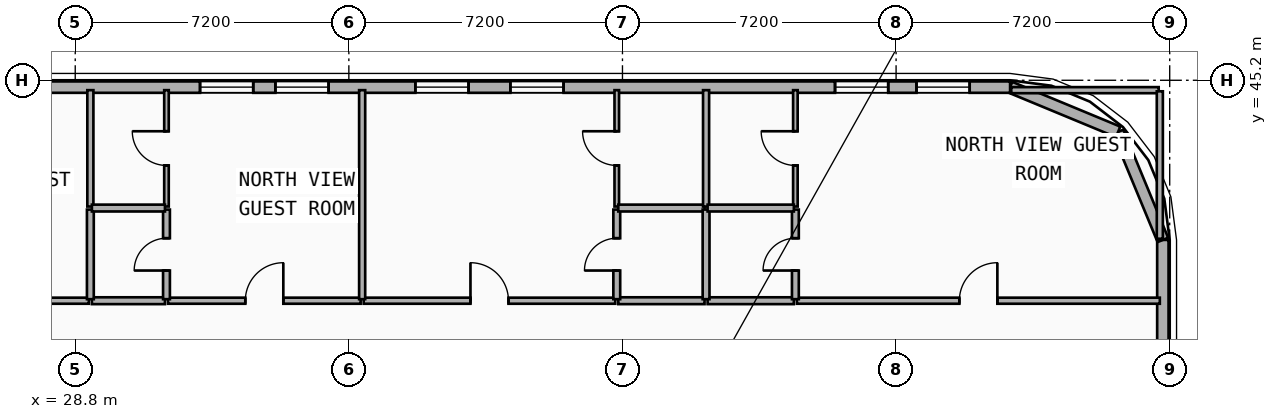
"""IFC4 building model, lengths in metres.
Left out: names, types, materials, properties, quantities, classifications, styles, units other than length and angle.
Written with IfcOpenShell. Run it as: python <this file> out.ifc"""

import sys

from ifc_helpers import new_model, si_unit, direction, frame, frame_2d, origin, place, context, subcontext, project, spatial, rectangle, extrude, element, fill, save


model = new_model("IFC4")
c1 = context("Model", 3, precision=1e-05, world=origin(), true_north=direction((0.0, 1.0)))
c2 = subcontext(c1, "Body", "Model", "MODEL_VIEW")
j1 = project(units=[si_unit("LENGTHUNIT", "METRE"), si_unit("PLANEANGLEUNIT", "RADIAN")], contexts=[c1])
p1 = place(None, origin())
s1 = spatial("IfcSite", under=j1, at=p1, CompositionType="ELEMENT")
p2 = place(p1, origin())
s2 = spatial("IfcBuilding", under=s1, at=p2, CompositionType="ELEMENT")
p3 = place(p2, frame((0.0, 0.0, 32.5)))
s3 = spatial("IfcBuildingStorey", under=s2, at=p3, CompositionType="ELEMENT", Elevation=32.5)
p4 = place(p3, frame((57.42, 41.0, 0.0), z_axis=(0.0, 0.0, 1.0), x_axis=(0.0, -1.0, 0.0)))
e1 = element("IfcWall", 1, at=p4, inside=s3, PredefinedType="SOLIDWALL", context=c2, shape_type="SweptSolid", body=[
    extrude(rectangle(XDim=15.2, YDim=0.3, at=frame_2d((7.6, 0.0))), origin(), (0.0, 0.0, 1.0), 3.24),
])
p5 = place(p4, frame((10.882, 0.0, 0.48)))
e2 = element("IfcOpeningElement", 2, at=p5, cuts=e1, PredefinedType="OPENING", context=c2, shape_type="SweptSolid", body=[
    extrude(rectangle(XDim=1.4, YDim=1.8, at=frame_2d((0.7, 0.9))), frame((0.0, 0.16, 0.0), z_axis=(0.0, -1.0, 0.0), x_axis=(1.0, 0.0, 0.0)), (0.0, 0.0, 1.0), 0.32),
])
p6 = place(p4, frame((5.621, 0.0, 0.48)))
e3 = element("IfcOpeningElement", 3, at=p6, cuts=e1, PredefinedType="OPENING", context=c2, shape_type="SweptSolid", body=[
    extrude(rectangle(XDim=1.4, YDim=1.8, at=frame_2d((0.7, 0.9))), frame((0.0, 0.16, 0.0), z_axis=(0.0, -1.0, 0.0), x_axis=(1.0, 0.0, 0.0)), (0.0, 0.0, 1.0), 0.32),
])
p7 = place(p3, frame((56.243, 43.843, 0.0), z_axis=(0.0, 0.0, 1.0), x_axis=(0.382636798336, -0.92389884758, 0.0)))
e4 = element("IfcWall", 4, at=p7, inside=s3, PredefinedType="SOLIDWALL", context=c2, shape_type="SweptSolid", body=[
    extrude(rectangle(XDim=3.077, YDim=0.3, at=frame_2d((1.538, 0.0))), origin(), (0.0, 0.0, 1.0), 3.24),
])
p8 = place(p3, frame((53.4, 45.02, 0.0), z_axis=(0.0, 0.0, 1.0), x_axis=(0.923882414032, -0.382676475685, 0.0)))
e5 = element("IfcWall", 5, at=p8, inside=s3, PredefinedType="SOLIDWALL", context=c2, shape_type="SweptSolid", body=[
    extrude(rectangle(XDim=3.077, YDim=0.3, at=frame_2d((1.539, 0.0))), origin(), (0.0, 0.0, 1.0), 3.24),
])
p9 = place(p3, frame((4.2, 45.02, 0.0), z_axis=(0.0, 0.0, 1.0), x_axis=(1.0, 0.0, 0.0)))
e6 = element("IfcWall", 6, at=p9, inside=s3, PredefinedType="SOLIDWALL", context=c2, shape_type="SweptSolid", body=[
    extrude(rectangle(XDim=49.2, YDim=0.3, at=frame_2d((24.6, 0.0))), origin(), (0.0, 0.0, 1.0), 3.24),
])
p10 = place(p9, frame((5.87, 0.0, 0.85)))
e7 = element("IfcOpeningElement", 7, at=p10, cuts=e6, PredefinedType="OPENING", context=c2, shape_type="SweptSolid", body=[
    extrude(rectangle(XDim=1.4, YDim=1.8, at=frame_2d((0.7, 0.9))), frame((0.0, 0.16, 0.0), z_axis=(0.0, -1.0, 0.0), x_axis=(1.0, 0.0, 0.0)), (0.0, 0.0, 1.0), 0.32),
])
p11 = place(p9, frame((8.481, 0.0, 0.85)))
e8 = element("IfcOpeningElement", 8, at=p11, cuts=e6, PredefinedType="OPENING", context=c2, shape_type="SweptSolid", body=[
    extrude(rectangle(XDim=1.4, YDim=1.8, at=frame_2d((0.7, 0.9))), frame((0.0, 0.16, 0.0), z_axis=(0.0, -1.0, 0.0), x_axis=(1.0, 0.0, 0.0)), (0.0, 0.0, 1.0), 0.32),
])
p12 = place(p9, frame((18.227, 0.0, 0.85)))
e9 = element("IfcOpeningElement", 9, at=p12, cuts=e6, PredefinedType="OPENING", context=c2, shape_type="SweptSolid", body=[
    extrude(rectangle(XDim=1.4, YDim=1.8, at=frame_2d((0.7, 0.9))), frame((0.0, 0.16, 0.0), z_axis=(0.0, -1.0, 0.0), x_axis=(1.0, 0.0, 0.0)), (0.0, 0.0, 1.0), 0.32),
])
p13 = place(p9, frame((21.462, 0.0, 0.85)))
e10 = element("IfcOpeningElement", 10, at=p13, cuts=e6, PredefinedType="OPENING", context=c2, shape_type="SweptSolid", body=[
    extrude(rectangle(XDim=1.4, YDim=1.8, at=frame_2d((0.7, 0.9))), frame((0.0, 0.16, 0.0), z_axis=(0.0, -1.0, 0.0), x_axis=(1.0, 0.0, 0.0)), (0.0, 0.0, 1.0), 0.32),
])
p14 = place(p9, frame((27.884, 0.0, 0.85)))
e11 = element("IfcOpeningElement", 11, at=p14, cuts=e6, PredefinedType="OPENING", context=c2, shape_type="SweptSolid", body=[
    extrude(rectangle(XDim=1.4, YDim=1.8, at=frame_2d((0.7, 0.9))), frame((0.0, 0.16, 0.0), z_axis=(0.0, -1.0, 0.0), x_axis=(1.0, 0.0, 0.0)), (0.0, 0.0, 1.0), 0.32),
])
p15 = place(p9, frame((29.867, 0.0, 0.85)))
e12 = element("IfcOpeningElement", 12, at=p15, cuts=e6, PredefinedType="OPENING", context=c2, shape_type="SweptSolid", body=[
    extrude(rectangle(XDim=1.4, YDim=1.8, at=frame_2d((0.7, 0.9))), frame((0.0, 0.16, 0.0), z_axis=(0.0, -1.0, 0.0), x_axis=(1.0, 0.0, 0.0)), (0.0, 0.0, 1.0), 0.32),
])
p16 = place(p9, frame((33.55, 0.0, 0.85)))
e13 = element("IfcOpeningElement", 13, at=p16, cuts=e6, PredefinedType="OPENING", context=c2, shape_type="SweptSolid", body=[
    extrude(rectangle(XDim=1.4, YDim=1.8, at=frame_2d((0.7, 0.9))), frame((0.0, 0.16, 0.0), z_axis=(0.0, -1.0, 0.0), x_axis=(1.0, 0.0, 0.0)), (0.0, 0.0, 1.0), 0.32),
])
p17 = place(p9, frame((36.05, 0.0, 0.85)))
e14 = element("IfcOpeningElement", 14, at=p17, cuts=e6, PredefinedType="OPENING", context=c2, shape_type="SweptSolid", body=[
    extrude(rectangle(XDim=1.4, YDim=1.8, at=frame_2d((0.7, 0.9))), frame((0.0, 0.16, 0.0), z_axis=(0.0, -1.0, 0.0), x_axis=(1.0, 0.0, 0.0)), (0.0, 0.0, 1.0), 0.32),
])
p18 = place(p9, frame((44.593, 0.0, 0.85)))
e15 = element("IfcOpeningElement", 15, at=p18, cuts=e6, PredefinedType="OPENING", context=c2, shape_type="SweptSolid", body=[
    extrude(rectangle(XDim=1.4, YDim=1.8, at=frame_2d((0.7, 0.9))), frame((0.0, 0.16, 0.0), z_axis=(0.0, -1.0, 0.0), x_axis=(1.0, 0.0, 0.0)), (0.0, 0.0, 1.0), 0.32),
])
p19 = place(p9, frame((46.737, 0.0, 0.85)))
e16 = element("IfcOpeningElement", 16, at=p19, cuts=e6, PredefinedType="OPENING", context=c2, shape_type="SweptSolid", body=[
    extrude(rectangle(XDim=1.4, YDim=1.8, at=frame_2d((0.7, 0.9))), frame((0.0, 0.16, 0.0), z_axis=(0.0, -1.0, 0.0), x_axis=(1.0, 0.0, 0.0)), (0.0, 0.0, 1.0), 0.32),
])
p20 = place(p3, frame((20.331, 39.4, 0.0), z_axis=(0.0, 0.0, 1.0), x_axis=(1.0, 0.0, 0.0)))
e17 = element("IfcWall", 17, at=p20, inside=s3, PredefinedType="PARTITIONING", context=c2, shape_type="SweptSolid", body=[
    extrude(rectangle(XDim=8.827, YDim=0.16, at=frame_2d((4.414, 0.0))), origin(), (0.0, 0.0, 1.0), 3.24),
])
p21 = place(p20, frame((3.914, 0.0, 0.0)))
e18 = element("IfcOpeningElement", 18, at=p21, cuts=e17, PredefinedType="OPENING", context=c2, shape_type="SweptSolid", body=[
    extrude(rectangle(XDim=1.0, YDim=2.15, at=frame_2d((0.5, 1.075))), frame((0.0, 0.09, 0.0), z_axis=(0.0, -1.0, 0.0), x_axis=(1.0, 0.0, 0.0)), (0.0, 0.0, 1.0), 0.18),
])
p22 = place(p3, frame((31.241, 39.4, 0.0), z_axis=(0.0, 0.0, 1.0), x_axis=(1.0, 0.0, 0.0)))
e19 = element("IfcWall", 19, at=p22, inside=s3, PredefinedType="PARTITIONING", context=c2, shape_type="SweptSolid", body=[
    extrude(rectangle(XDim=5.069, YDim=0.16, at=frame_2d((2.535, 0.0))), origin(), (0.0, 0.0, 1.0), 3.24),
])
p23 = place(p22, frame((2.034, 0.0, 0.0)))
e20 = element("IfcOpeningElement", 20, at=p23, cuts=e19, PredefinedType="OPENING", context=c2, shape_type="SweptSolid", body=[
    extrude(rectangle(XDim=1.0, YDim=2.15, at=frame_2d((0.5, 1.075))), frame((0.0, 0.09, 0.0), z_axis=(0.0, -1.0, 0.0), x_axis=(1.0, 0.0, 0.0)), (0.0, 0.0, 1.0), 0.18),
])
p24 = place(p3, frame((29.238, 39.4, 0.0), z_axis=(0.0, 0.0, 1.0), x_axis=(1.0, 0.0, 0.0)))
e21 = element("IfcWall", 21, at=p24, inside=s3, PredefinedType="PLUMBINGWALL", context=c2, shape_type="SweptSolid", body=[
    extrude(rectangle(XDim=1.923, YDim=0.18, at=frame_2d((0.961, 0.0))), origin(), (0.0, 0.0, 1.0), 3.24),
])
p25 = place(p3, frame((36.39, 39.4, 0.0), z_axis=(0.0, 0.0, 1.0), x_axis=(1.0, 0.0, 0.0)))
e22 = element("IfcWall", 22, at=p25, inside=s3, PredefinedType="PARTITIONING", context=c2, shape_type="SweptSolid", body=[
    extrude(rectangle(XDim=6.62, YDim=0.16, at=frame_2d((3.31, 0.0))), origin(), (0.0, 0.0, 1.0), 3.24),
])
p26 = place(p25, frame((2.81, 0.0, 0.0)))
e23 = element("IfcOpeningElement", 23, at=p26, cuts=e22, PredefinedType="OPENING", context=c2, shape_type="SweptSolid", body=[
    extrude(rectangle(XDim=1.0, YDim=2.15, at=frame_2d((0.5, 1.075))), frame((0.0, 0.09, 0.0), z_axis=(0.0, -1.0, 0.0), x_axis=(1.0, 0.0, 0.0)), (0.0, 0.0, 1.0), 0.18),
])
p27 = place(p3, frame((43.09, 39.4, 0.0), z_axis=(0.0, 0.0, 1.0), x_axis=(1.0, 0.0, 0.0)))
e24 = element("IfcWall", 24, at=p27, inside=s3, PredefinedType="PLUMBINGWALL", context=c2, shape_type="SweptSolid", body=[
    extrude(rectangle(XDim=2.27, YDim=0.18, at=frame_2d((1.135, 0.0))), origin(), (0.0, 0.0, 1.0), 3.24),
])
p28 = place(p3, frame((47.79, 39.4, 0.0), z_axis=(0.0, 0.0, 1.0), x_axis=(1.0, 0.0, 0.0)))
e25 = element("IfcWall", 25, at=p28, inside=s3, PredefinedType="PARTITIONING", context=c2, shape_type="SweptSolid", body=[
    extrude(rectangle(XDim=9.55, YDim=0.16, at=frame_2d((4.775, 0.0))), origin(), (0.0, 0.0, 1.0), 3.24),
])
p29 = place(p28, frame((4.275, 0.0, 0.0)))
e26 = element("IfcOpeningElement", 26, at=p29, cuts=e25, PredefinedType="OPENING", context=c2, shape_type="SweptSolid", body=[
    extrude(rectangle(XDim=1.0, YDim=2.15, at=frame_2d((0.5, 1.075))), frame((0.0, 0.09, 0.0), z_axis=(0.0, -1.0, 0.0), x_axis=(1.0, 0.0, 0.0)), (0.0, 0.0, 1.0), 0.18),
])
p30 = place(p3, frame((45.44, 39.4, 0.0), z_axis=(0.0, 0.0, 1.0), x_axis=(1.0, 0.0, 0.0)))
e27 = element("IfcWall", 27, at=p30, inside=s3, PredefinedType="PLUMBINGWALL", context=c2, shape_type="SweptSolid", body=[
    extrude(rectangle(XDim=2.27, YDim=0.18, at=frame_2d((1.135, 0.0))), origin(), (0.0, 0.0, 1.0), 3.24),
])
p31 = place(p3, frame((29.198, 39.44, 0.0), z_axis=(0.0, 0.0, 1.0), x_axis=(0.0, 1.0, 0.0)))
e28 = element("IfcWall", 28, at=p31, inside=s3, PredefinedType="PLUMBINGWALL", context=c2, shape_type="SweptSolid", body=[
    extrude(rectangle(XDim=2.358, YDim=0.18, at=frame_2d((1.179, 0.0))), origin(), (0.0, 0.0, 1.0), 3.24),
])
p32 = place(p3, frame((29.198, 41.878, 0.0), z_axis=(0.0, 0.0, 1.0), x_axis=(0.0, 1.0, 0.0)))
e29 = element("IfcWall", 29, at=p32, inside=s3, PredefinedType="PARTITIONING", context=c2, shape_type="SweptSolid", body=[
    extrude(rectangle(XDim=3.062, YDim=0.16, at=frame_2d((1.531, 0.0))), origin(), (0.0, 0.0, 1.0), 3.24),
])
p33 = place(p3, frame((31.201, 39.44, 0.0), z_axis=(0.0, 0.0, 1.0), x_axis=(0.0, 1.0, 0.0)))
e30 = element("IfcWall", 30, at=p33, inside=s3, PredefinedType="PLUMBINGWALL", context=c2, shape_type="SweptSolid", body=[
    extrude(rectangle(XDim=2.358, YDim=0.18, at=frame_2d((1.179, 0.0))), origin(), (0.0, 0.0, 1.0), 3.24),
])
p34 = place(p33, frame((0.754, 0.0, 0.0)))
e31 = element("IfcOpeningElement", 31, at=p34, cuts=e30, PredefinedType="OPENING", context=c2, shape_type="SweptSolid", body=[
    extrude(rectangle(XDim=0.85, YDim=2.1, at=frame_2d((0.425, 1.05))), frame((0.0, 0.1, 0.0), z_axis=(0.0, -1.0, 0.0), x_axis=(1.0, 0.0, 0.0)), (0.0, 0.0, 1.0), 0.2),
])
p35 = place(p3, frame((31.201, 41.878, 0.0), z_axis=(0.0, 0.0, 1.0), x_axis=(0.0, 1.0, 0.0)))
e32 = element("IfcWall", 32, at=p35, inside=s3, PredefinedType="PARTITIONING", context=c2, shape_type="SweptSolid", body=[
    extrude(rectangle(XDim=3.062, YDim=0.12, at=frame_2d((1.531, 0.0))), origin(), (0.0, 0.0, 1.0), 3.24),
])
p36 = place(p35, frame((1.081, 0.0, 0.0)))
e33 = element("IfcOpeningElement", 33, at=p36, cuts=e32, PredefinedType="OPENING", context=c2, shape_type="SweptSolid", body=[
    extrude(rectangle(XDim=0.9, YDim=2.1, at=frame_2d((0.45, 1.05))), frame((0.0, 0.07, 0.0), z_axis=(0.0, -1.0, 0.0), x_axis=(1.0, 0.0, 0.0)), (0.0, 0.0, 1.0), 0.14),
])
p37 = place(p3, frame((36.35, 39.44, 0.0), z_axis=(0.0, 0.0, 1.0), x_axis=(0.0, 1.0, 0.0)))
e34 = element("IfcWall", 34, at=p37, inside=s3, PredefinedType="PARTITIONING", context=c2, shape_type="SweptSolid", body=[
    extrude(rectangle(XDim=5.5, YDim=0.16, at=frame_2d((2.75, 0.0))), origin(), (0.0, 0.0, 1.0), 3.24),
])
p38 = place(p3, frame((29.238, 41.838, 0.0), z_axis=(0.0, 0.0, 1.0), x_axis=(1.0, 0.0, 0.0)))
e35 = element("IfcWall", 35, at=p38, inside=s3, PredefinedType="PLUMBINGWALL", context=c2, shape_type="SweptSolid", body=[
    extrude(rectangle(XDim=1.923, YDim=0.18, at=frame_2d((0.961, 0.0))), origin(), (0.0, 0.0, 1.0), 3.24),
])
p39 = place(p3, frame((43.05, 39.44, 0.0), z_axis=(0.0, 0.0, 1.0), x_axis=(0.0, 1.0, 0.0)))
e36 = element("IfcWall", 36, at=p39, inside=s3, PredefinedType="PLUMBINGWALL", context=c2, shape_type="SweptSolid", body=[
    extrude(rectangle(XDim=2.358, YDim=0.18, at=frame_2d((1.179, 0.0))), origin(), (0.0, 0.0, 1.0), 3.24),
])
p40 = place(p39, frame((0.754, 0.0, 0.0)))
e37 = element("IfcOpeningElement", 37, at=p40, cuts=e36, PredefinedType="OPENING", context=c2, shape_type="SweptSolid", body=[
    extrude(rectangle(XDim=0.85, YDim=2.1, at=frame_2d((0.425, 1.05))), frame((0.0, 0.1, 0.0), z_axis=(0.0, -1.0, 0.0), x_axis=(1.0, 0.0, 0.0)), (0.0, 0.0, 1.0), 0.2),
])
p41 = place(p3, frame((43.05, 41.878, 0.0), z_axis=(0.0, 0.0, 1.0), x_axis=(0.0, 1.0, 0.0)))
e38 = element("IfcWall", 38, at=p41, inside=s3, PredefinedType="PARTITIONING", context=c2, shape_type="SweptSolid", body=[
    extrude(rectangle(XDim=3.062, YDim=0.12, at=frame_2d((1.531, 0.0))), origin(), (0.0, 0.0, 1.0), 3.24),
])
p42 = place(p41, frame((1.081, 0.0, 0.0)))
e39 = element("IfcOpeningElement", 39, at=p42, cuts=e38, PredefinedType="OPENING", context=c2, shape_type="SweptSolid", body=[
    extrude(rectangle(XDim=0.9, YDim=2.1, at=frame_2d((0.45, 1.05))), frame((0.0, 0.07, 0.0), z_axis=(0.0, -1.0, 0.0), x_axis=(1.0, 0.0, 0.0)), (0.0, 0.0, 1.0), 0.14),
])
p43 = place(p3, frame((43.09, 41.838, 0.0), z_axis=(0.0, 0.0, 1.0), x_axis=(1.0, 0.0, 0.0)))
e40 = element("IfcWall", 40, at=p43, inside=s3, PredefinedType="PLUMBINGWALL", context=c2, shape_type="SweptSolid", body=[
    extrude(rectangle(XDim=2.27, YDim=0.18, at=frame_2d((1.135, 0.0))), origin(), (0.0, 0.0, 1.0), 3.24),
])
p44 = place(p3, frame((45.4, 39.44, 0.0), z_axis=(0.0, 0.0, 1.0), x_axis=(0.0, 1.0, 0.0)))
e41 = element("IfcWall", 41, at=p44, inside=s3, PredefinedType="PLUMBINGWALL", context=c2, shape_type="SweptSolid", body=[
    extrude(rectangle(XDim=2.358, YDim=0.18, at=frame_2d((1.179, 0.0))), origin(), (0.0, 0.0, 1.0), 3.24),
])
p45 = place(p3, frame((45.4, 41.878, 0.0), z_axis=(0.0, 0.0, 1.0), x_axis=(0.0, 1.0, 0.0)))
e42 = element("IfcWall", 42, at=p45, inside=s3, PredefinedType="PARTITIONING", context=c2, shape_type="SweptSolid", body=[
    extrude(rectangle(XDim=3.062, YDim=0.16, at=frame_2d((1.531, 0.0))), origin(), (0.0, 0.0, 1.0), 3.24),
])
p46 = place(p3, frame((47.75, 39.44, 0.0), z_axis=(0.0, 0.0, 1.0), x_axis=(0.0, 1.0, 0.0)))
e43 = element("IfcWall", 43, at=p46, inside=s3, PredefinedType="PLUMBINGWALL", context=c2, shape_type="SweptSolid", body=[
    extrude(rectangle(XDim=2.358, YDim=0.18, at=frame_2d((1.179, 0.0))), origin(), (0.0, 0.0, 1.0), 3.24),
])
p47 = place(p46, frame((0.754, 0.0, 0.0)))
e44 = element("IfcOpeningElement", 44, at=p47, cuts=e43, PredefinedType="OPENING", context=c2, shape_type="SweptSolid", body=[
    extrude(rectangle(XDim=0.85, YDim=2.1, at=frame_2d((0.425, 1.05))), frame((0.0, 0.1, 0.0), z_axis=(0.0, -1.0, 0.0), x_axis=(1.0, 0.0, 0.0)), (0.0, 0.0, 1.0), 0.2),
])
p48 = place(p3, frame((47.75, 41.878, 0.0), z_axis=(0.0, 0.0, 1.0), x_axis=(0.0, 1.0, 0.0)))
e45 = element("IfcWall", 45, at=p48, inside=s3, PredefinedType="PARTITIONING", context=c2, shape_type="SweptSolid", body=[
    extrude(rectangle(XDim=3.062, YDim=0.12, at=frame_2d((1.531, 0.0))), origin(), (0.0, 0.0, 1.0), 3.24),
])
p49 = place(p48, frame((1.081, 0.0, 0.0)))
e46 = element("IfcOpeningElement", 46, at=p49, cuts=e45, PredefinedType="OPENING", context=c2, shape_type="SweptSolid", body=[
    extrude(rectangle(XDim=0.9, YDim=2.1, at=frame_2d((0.45, 1.05))), frame((0.0, 0.07, 0.0), z_axis=(0.0, -1.0, 0.0), x_axis=(1.0, 0.0, 0.0)), (0.0, 0.0, 1.0), 0.14),
])
p50 = place(p3, frame((45.44, 41.838, 0.0), z_axis=(0.0, 0.0, 1.0), x_axis=(1.0, 0.0, 0.0)))
e47 = element("IfcWall", 47, at=p50, inside=s3, PredefinedType="PLUMBINGWALL", context=c2, shape_type="SweptSolid", body=[
    extrude(rectangle(XDim=2.27, YDim=0.18, at=frame_2d((1.135, 0.0))), origin(), (0.0, 0.0, 1.0), 3.24),
])
p51 = place(p3, frame((53.43, 44.94, 0.0), z_axis=(0.0, 0.0, 1.0), x_axis=(1.0, 0.0, 0.0)))
e48 = element("IfcWall", 48, at=p51, inside=s3, PredefinedType="PARTITIONING", context=c2, shape_type="SweptSolid", body=[
    extrude(rectangle(XDim=3.88, YDim=0.16, at=frame_2d((1.94, 0.0))), origin(), (0.0, 0.0, 1.0), 3.24),
])
p52 = place(p3, frame((57.34, 41.03, 0.0), z_axis=(0.0, 0.0, 1.0), x_axis=(0.0, 1.0, 0.0)))
e49 = element("IfcWall", 49, at=p52, inside=s3, PredefinedType="PARTITIONING", context=c2, shape_type="SweptSolid", body=[
    extrude(rectangle(XDim=3.88, YDim=0.16, at=frame_2d((1.94, 0.0))), origin(), (0.0, 0.0, 1.0), 3.24),
])
p53 = place(p14, origin())
e50 = element("IfcWindow", 50, at=p53, inside=s3, PartitioningType="SINGLE_PANEL", PredefinedType="WINDOW", context=c2, shape_type="SweptSolid", body=[
    extrude(rectangle(XDim=1.4, YDim=1.8, at=frame_2d((0.7, 0.9))), frame((0.0, 0.03, 0.0), z_axis=(0.0, -1.0, 0.0), x_axis=(1.0, 0.0, 0.0)), (0.0, 0.0, 1.0), 0.06),
])
fill(e11, e50)
p54 = place(p15, origin())
e51 = element("IfcWindow", 51, at=p54, inside=s3, PartitioningType="SINGLE_PANEL", PredefinedType="WINDOW", context=c2, shape_type="SweptSolid", body=[
    extrude(rectangle(XDim=1.4, YDim=1.8, at=frame_2d((0.7, 0.9))), frame((0.0, 0.03, 0.0), z_axis=(0.0, -1.0, 0.0), x_axis=(1.0, 0.0, 0.0)), (0.0, 0.0, 1.0), 0.06),
])
fill(e12, e51)
p55 = place(p16, origin())
e52 = element("IfcWindow", 52, at=p55, inside=s3, PartitioningType="SINGLE_PANEL", PredefinedType="WINDOW", context=c2, shape_type="SweptSolid", body=[
    extrude(rectangle(XDim=1.4, YDim=1.8, at=frame_2d((0.7, 0.9))), frame((0.0, 0.03, 0.0), z_axis=(0.0, -1.0, 0.0), x_axis=(1.0, 0.0, 0.0)), (0.0, 0.0, 1.0), 0.06),
])
fill(e13, e52)
p56 = place(p17, origin())
e53 = element("IfcWindow", 53, at=p56, inside=s3, PartitioningType="SINGLE_PANEL", PredefinedType="WINDOW", context=c2, shape_type="SweptSolid", body=[
    extrude(rectangle(XDim=1.4, YDim=1.8, at=frame_2d((0.7, 0.9))), frame((0.0, 0.03, 0.0), z_axis=(0.0, -1.0, 0.0), x_axis=(1.0, 0.0, 0.0)), (0.0, 0.0, 1.0), 0.06),
])
fill(e14, e53)
p57 = place(p18, origin())
e54 = element("IfcWindow", 54, at=p57, inside=s3, PartitioningType="SINGLE_PANEL", PredefinedType="WINDOW", context=c2, shape_type="SweptSolid", body=[
    extrude(rectangle(XDim=1.4, YDim=1.8, at=frame_2d((0.7, 0.9))), frame((0.0, 0.03, 0.0), z_axis=(0.0, -1.0, 0.0), x_axis=(1.0, 0.0, 0.0)), (0.0, 0.0, 1.0), 0.06),
])
fill(e15, e54)
p58 = place(p19, origin())
e55 = element("IfcWindow", 55, at=p58, inside=s3, PartitioningType="SINGLE_PANEL", PredefinedType="WINDOW", context=c2, shape_type="SweptSolid", body=[
    extrude(rectangle(XDim=1.4, YDim=1.8, at=frame_2d((0.7, 0.9))), frame((0.0, 0.03, 0.0), z_axis=(0.0, -1.0, 0.0), x_axis=(1.0, 0.0, 0.0)), (0.0, 0.0, 1.0), 0.06),
])
fill(e16, e55)
p59 = place(p23, origin())
e56 = element("IfcDoor", 56, at=p59, inside=s3, OperationType="SINGLE_SWING_RIGHT", PredefinedType="DOOR", context=c2, shape_type="SweptSolid", body=[
    extrude(rectangle(XDim=1.0, YDim=2.15, at=frame_2d((0.5, 1.075))), frame((0.0, 0.025, 0.0), z_axis=(0.0, -1.0, 0.0), x_axis=(1.0, 0.0, 0.0)), (0.0, 0.0, 1.0), 0.05),
])
fill(e20, e56)
p60 = place(p26, origin())
e57 = element("IfcDoor", 57, at=p60, inside=s3, OperationType="SINGLE_SWING_LEFT", PredefinedType="DOOR", context=c2, shape_type="SweptSolid", body=[
    extrude(rectangle(XDim=1.0, YDim=2.15, at=frame_2d((0.5, 1.075))), frame((0.0, 0.025, 0.0), z_axis=(0.0, -1.0, 0.0), x_axis=(1.0, 0.0, 0.0)), (0.0, 0.0, 1.0), 0.05),
])
fill(e23, e57)
p61 = place(p29, origin())
e58 = element("IfcDoor", 58, at=p61, inside=s3, OperationType="SINGLE_SWING_RIGHT", PredefinedType="DOOR", context=c2, shape_type="SweptSolid", body=[
    extrude(rectangle(XDim=1.0, YDim=2.15, at=frame_2d((0.5, 1.075))), frame((0.0, 0.025, 0.0), z_axis=(0.0, -1.0, 0.0), x_axis=(1.0, 0.0, 0.0)), (0.0, 0.0, 1.0), 0.05),
])
fill(e26, e58)
p62 = place(p34, origin())
e59 = element("IfcDoor", 59, at=p62, inside=s3, OperationType="SINGLE_SWING_LEFT", PredefinedType="DOOR", context=c2, shape_type="SweptSolid", body=[
    extrude(rectangle(XDim=0.85, YDim=2.1, at=frame_2d((0.425, 1.05))), frame((0.0, 0.025, 0.0), z_axis=(0.0, -1.0, 0.0), x_axis=(1.0, 0.0, 0.0)), (0.0, 0.0, 1.0), 0.05),
])
fill(e31, e59)
p63 = place(p36, origin())
e60 = element("IfcDoor", 60, at=p63, inside=s3, OperationType="SINGLE_SWING_RIGHT", PredefinedType="DOOR", context=c2, shape_type="SweptSolid", body=[
    extrude(rectangle(XDim=0.9, YDim=2.1, at=frame_2d((0.45, 1.05))), frame((0.0, 0.025, 0.0), z_axis=(0.0, -1.0, 0.0), x_axis=(1.0, 0.0, 0.0)), (0.0, 0.0, 1.0), 0.05),
])
fill(e33, e60)
p64 = place(p40, origin())
e61 = element("IfcDoor", 61, at=p64, inside=s3, OperationType="SINGLE_SWING_LEFT", PredefinedType="DOOR", context=c2, shape_type="SweptSolid", body=[
    extrude(rectangle(XDim=0.85, YDim=2.1, at=frame_2d((0.425, 1.05))), frame((0.0, 0.025, 0.0), z_axis=(0.0, -1.0, 0.0), x_axis=(1.0, 0.0, 0.0)), (0.0, 0.0, 1.0), 0.05),
])
fill(e37, e61)
p65 = place(p42, origin())
e62 = element("IfcDoor", 62, at=p65, inside=s3, OperationType="SINGLE_SWING_RIGHT", PredefinedType="DOOR", context=c2, shape_type="SweptSolid", body=[
    extrude(rectangle(XDim=0.9, YDim=2.1, at=frame_2d((0.45, 1.05))), frame((0.0, 0.025, 0.0), z_axis=(0.0, -1.0, 0.0), x_axis=(1.0, 0.0, 0.0)), (0.0, 0.0, 1.0), 0.05),
])
fill(e39, e62)
p66 = place(p47, origin())
e63 = element("IfcDoor", 63, at=p66, inside=s3, OperationType="SINGLE_SWING_LEFT", PredefinedType="DOOR", context=c2, shape_type="SweptSolid", body=[
    extrude(rectangle(XDim=0.85, YDim=2.1, at=frame_2d((0.425, 1.05))), frame((0.0, 0.025, 0.0), z_axis=(0.0, -1.0, 0.0), x_axis=(1.0, 0.0, 0.0)), (0.0, 0.0, 1.0), 0.05),
])
fill(e44, e63)
p67 = place(p49, origin())
e64 = element("IfcDoor", 64, at=p67, inside=s3, OperationType="SINGLE_SWING_RIGHT", PredefinedType="DOOR", context=c2, shape_type="SweptSolid", body=[
    extrude(rectangle(XDim=0.9, YDim=2.1, at=frame_2d((0.45, 1.05))), frame((0.0, 0.025, 0.0), z_axis=(0.0, -1.0, 0.0), x_axis=(1.0, 0.0, 0.0)), (0.0, 0.0, 1.0), 0.05),
])
fill(e46, e64)
save(model, sys.argv[1])
